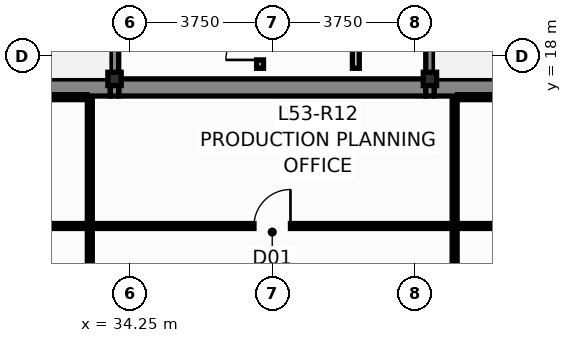
"""IFC4 building model, lengths in metres.
Left out: names, types, materials, properties, quantities, classifications, styles, units other than length and angle.
Written with IfcOpenShell. Run it as: python <this file> out.ifc"""

import sys

from ifc_helpers import new_model, si_unit, direction, frame, frame_2d, origin, origin_2d, place, context, subcontext, project, spatial, rectangle, hollow_rectangle, extrude, source, transform, mapped, element, fill, save


model = new_model("IFC4")
c1 = context("Model", 3, precision=1e-05, world=origin(), true_north=direction((0.0, 1.0)))
c2 = subcontext(c1, "Body", "Model", "MODEL_VIEW")
j1 = project(units=[si_unit("LENGTHUNIT", "METRE"), si_unit("PLANEANGLEUNIT", "RADIAN")], contexts=[c1])
p1 = place(None, origin())
s1 = spatial("IfcSite", under=j1, at=p1, CompositionType="ELEMENT")
p2 = place(p1, origin())
s2 = spatial("IfcBuilding", under=s1, at=p2, CompositionType="ELEMENT")
p3 = place(p2, frame((0.0, 0.0, 202.3)))
s3 = spatial("IfcBuildingStorey", under=s2, at=p3, CompositionType="ELEMENT", Elevation=202.3)
m1 = source(origin(), c2, "Body", "SweptSolid", [
    extrude(hollow_rectangle(XDim=0.35, YDim=0.35, WallThickness=0.016, at=origin_2d()), origin(), (0.0, 0.0, 1.0), 3.65),
])
for number, where, z_axis, x_axis in (
    (1, (33.85, 17.4, 0.0), (0.0, 0.0, 1.0), (1.0, 0.0, 0.0)),
    (2, (42.15, 17.4, 0.0), (0.0, 0.0, 1.0), (1.0, 0.0, 0.0)),
):
    element("IfcColumn", number, at=place(p3, frame(where, z_axis=z_axis, x_axis=x_axis)), inside=s3, PredefinedType="COLUMN", context=c2, shape_type="MappedRepresentation", body=[
        mapped(m1, transform((0.0, 0.0, 0.0), scale=1.0)),
    ])
p4 = place(p3, frame((30.84, 17.175, 0.0), z_axis=(0.0, 0.0, 1.0), x_axis=(1.0, 0.0, 0.0)))
e3 = element("IfcWall", 3, at=p4, inside=s3, PredefinedType="SHEAR", context=c2, shape_type="SweptSolid", body=[
    extrude(rectangle(XDim=2.9, YDim=0.45, at=frame_2d((1.45, 0.0))), origin(), (0.0, 0.0, 1.0), 3.65),
])
p5 = place(p3, frame((33.96, 17.175, 0.0), z_axis=(0.0, 0.0, 1.0), x_axis=(1.0, 0.0, 0.0)))
e4 = element("IfcWall", 4, at=p5, inside=s3, PredefinedType="SHEAR", context=c2, shape_type="SweptSolid", body=[
    extrude(rectangle(XDim=8.08, YDim=0.45, at=frame_2d((4.04, 0.0))), origin(), (0.0, 0.0, 1.0), 3.65),
])
p6 = place(p3, frame((42.26, 17.175, 0.0), z_axis=(0.0, 0.0, 1.0), x_axis=(1.0, 0.0, 0.0)))
e5 = element("IfcWall", 5, at=p6, inside=s3, PredefinedType="SHEAR", context=c2, shape_type="SweptSolid", body=[
    extrude(rectangle(XDim=2.9, YDim=0.45, at=frame_2d((1.45, 0.0))), origin(), (0.0, 0.0, 1.0), 3.65),
])
for number, where, z_axis, x_axis in (
    (6, (33.85, 16.95, 0.0), (0.0, 0.0, 1.0), (0.0, 1.0, 0.0)),
    (7, (42.15, 16.95, 0.0), (0.0, 0.0, 1.0), (0.0, 1.0, 0.0)),
):
    element("IfcWall", number, at=place(p3, frame(where, z_axis=z_axis, x_axis=x_axis)), inside=s3, PredefinedType="SHEAR", context=c2, shape_type="SweptSolid", body=[
        extrude(rectangle(XDim=13.275, YDim=0.22, at=frame_2d((6.638, 0.0))), origin(), (0.0, 0.0, 1.0), 3.65),
    ])
p7 = place(p3, frame((37.68, 17.68, 0.0), z_axis=(0.0, 0.0, 1.0), x_axis=(0.0, 1.0, 0.0)))
e8 = element("IfcWall", 8, at=p7, inside=s3, PredefinedType="PARTITIONING", context=c2, shape_type="SweptSolid", body=[
    extrude(rectangle(XDim=2.7, YDim=0.18, at=frame_2d((1.35, 0.0))), origin(), (0.0, 0.0, 1.0), 3.4),
])
p8 = place(p7, frame((0.22, 0.0, 0.0)))
e9 = element("IfcOpeningElement", 9, at=p8, cuts=e8, PredefinedType="OPENING", context=c2, shape_type="SweptSolid", body=[
    extrude(rectangle(XDim=0.9, YDim=2.1, at=frame_2d((0.45, 1.05))), frame((0.0, 0.102, 0.0), z_axis=(0.0, -1.0, 0.0), x_axis=(1.0, 0.0, 0.0)), (0.0, 0.0, 1.0), 0.204),
])
p9 = place(p7, frame((1.54, 0.0, 0.0)))
e10 = element("IfcOpeningElement", 10, at=p9, cuts=e8, PredefinedType="OPENING", context=c2, shape_type="SweptSolid", body=[
    extrude(rectangle(XDim=0.9, YDim=2.1, at=frame_2d((0.45, 1.05))), frame((0.0, 0.102, 0.0), z_axis=(0.0, -1.0, 0.0), x_axis=(1.0, 0.0, 0.0)), (0.0, 0.0, 1.0), 0.204),
])
p10 = place(p3, frame((40.2, 17.68, 0.0), z_axis=(0.0, 0.0, 1.0), x_axis=(0.0, 1.0, 0.0)))
e11 = element("IfcWall", 11, at=p10, inside=s3, PredefinedType="PARTITIONING", context=c2, shape_type="SweptSolid", body=[
    extrude(rectangle(XDim=2.7, YDim=0.18, at=frame_2d((1.35, 0.0))), origin(), (0.0, 0.0, 1.0), 3.4),
])
p11 = place(p10, frame((0.85, 0.0, 0.0)))
e12 = element("IfcOpeningElement", 12, at=p11, cuts=e11, PredefinedType="OPENING", context=c2, shape_type="SweptSolid", body=[
    extrude(rectangle(XDim=0.9, YDim=2.1, at=frame_2d((0.45, 1.05))), frame((0.0, 0.102, 0.0), z_axis=(0.0, -1.0, 0.0), x_axis=(1.0, 0.0, 0.0)), (0.0, 0.0, 1.0), 0.204),
])
p12 = place(p3, frame((23.505, 13.53, 0.0), z_axis=(0.0, 0.0, 1.0), x_axis=(1.0, 0.0, 0.0)))
e13 = element("IfcWall", 13, at=p12, inside=s3, PredefinedType="PARTITIONING", context=c2, shape_type="SweptSolid", body=[
    extrude(rectangle(XDim=9.69, YDim=0.13, at=frame_2d((4.845, 0.0))), origin(), (0.0, 0.0, 1.0), 3.078),
])
p13 = place(p12, frame((4.365, 0.0, 0.0)))
e14 = element("IfcOpeningElement", 14, at=p13, cuts=e13, PredefinedType="OPENING", context=c2, shape_type="SweptSolid", body=[
    extrude(rectangle(XDim=0.96, YDim=2.15, at=frame_2d((0.48, 1.075))), frame((0.0, 0.077, 0.0), z_axis=(0.0, -1.0, 0.0), x_axis=(1.0, 0.0, 0.0)), (0.0, 0.0, 1.0), 0.154),
])
p14 = place(p3, frame((42.805, 13.53, 0.0), z_axis=(0.0, 0.0, 1.0), x_axis=(1.0, 0.0, 0.0)))
e15 = element("IfcWall", 15, at=p14, inside=s3, PredefinedType="PARTITIONING", context=c2, shape_type="SweptSolid", body=[
    extrude(rectangle(XDim=9.69, YDim=0.13, at=frame_2d((4.845, 0.0))), origin(), (0.0, 0.0, 1.0), 3.078),
])
p15 = place(p14, frame((4.365, 0.0, 0.0)))
e16 = element("IfcOpeningElement", 16, at=p15, cuts=e15, PredefinedType="OPENING", context=c2, shape_type="SweptSolid", body=[
    extrude(rectangle(XDim=0.96, YDim=2.15, at=frame_2d((0.48, 1.075))), frame((0.0, 0.077, 0.0), z_axis=(0.0, -1.0, 0.0), x_axis=(1.0, 0.0, 0.0)), (0.0, 0.0, 1.0), 0.154),
])
p16 = place(p3, frame((42.875, 16.92, 0.0), z_axis=(0.0, 0.0, 1.0), x_axis=(1.0, 0.0, 0.0)))
e17 = element("IfcWall", 17, at=p16, inside=s3, PredefinedType="PARTITIONING", context=c2, shape_type="SweptSolid", body=[
    extrude(rectangle(XDim=9.62, YDim=0.13, at=frame_2d((4.81, 0.0))), origin(), (0.0, 0.0, 1.0), 2.925),
])
p17 = place(p16, frame((4.33, 0.0, 0.0)))
e18 = element("IfcOpeningElement", 18, at=p17, cuts=e17, PredefinedType="OPENING", context=c2, shape_type="SweptSolid", body=[
    extrude(rectangle(XDim=0.96, YDim=2.15, at=frame_2d((0.48, 1.075))), frame((0.0, 0.077, 0.0), z_axis=(0.0, -1.0, 0.0), x_axis=(1.0, 0.0, 0.0)), (0.0, 0.0, 1.0), 0.154),
])
p18 = place(p3, frame((33.205, 13.53, 0.0), z_axis=(0.0, 0.0, 1.0), x_axis=(1.0, 0.0, 0.0)))
e19 = element("IfcWall", 19, at=p18, inside=s3, PredefinedType="PARTITIONING", context=c2, shape_type="SweptSolid", body=[
    extrude(rectangle(XDim=9.59, YDim=0.13, at=frame_2d((4.795, 0.0))), origin(), (0.0, 0.0, 1.0), 3.078),
])
p19 = place(p18, frame((4.315, 0.0, 0.0)))
e20 = element("IfcOpeningElement", 20, at=p19, cuts=e19, PredefinedType="OPENING", context=c2, shape_type="SweptSolid", body=[
    extrude(rectangle(XDim=0.96, YDim=2.15, at=frame_2d((0.48, 1.075))), frame((0.0, 0.077, 0.0), z_axis=(0.0, -1.0, 0.0), x_axis=(1.0, 0.0, 0.0)), (0.0, 0.0, 1.0), 0.154),
])
p20 = place(p3, frame((27.405, 16.92, 0.0), z_axis=(0.0, 0.0, 1.0), x_axis=(1.0, 0.0, 0.0)))
e21 = element("IfcWall", 21, at=p20, inside=s3, PredefinedType="PARTITIONING", context=c2, shape_type="SweptSolid", body=[
    extrude(rectangle(XDim=5.72, YDim=0.13, at=frame_2d((2.86, 0.0))), origin(), (0.0, 0.0, 1.0), 2.925),
])
for number, where, z_axis, x_axis in (
    (22, (33.2, 13.535, 0.0), (0.0, 0.0, 1.0), (0.0, 1.0, 0.0)),
    (23, (42.8, 13.535, 0.0), (0.0, 0.0, 1.0), (0.0, 1.0, 0.0)),
):
    element("IfcWall", number, at=place(p3, frame(where, z_axis=z_axis, x_axis=x_axis)), inside=s3, PredefinedType="PARTITIONING", context=c2, shape_type="SweptSolid", body=[
        extrude(rectangle(XDim=3.31, YDim=0.13, at=frame_2d((1.655, 0.0))), origin(), (0.0, 0.0, 1.0), 3.4),
    ])
p21 = place(p3, frame((33.2, 10.145, 0.0), z_axis=(0.0, 0.0, 1.0), x_axis=(0.0, 1.0, 0.0)))
e24 = element("IfcWall", 24, at=p21, inside=s3, PredefinedType="PARTITIONING", context=c2, shape_type="SweptSolid", body=[
    extrude(rectangle(XDim=3.38, YDim=0.13, at=frame_2d((1.69, 0.0))), origin(), (0.0, 0.0, 1.0), 3.4),
])
p22 = place(p21, frame((1.21, 0.0, 0.0)))
e25 = element("IfcOpeningElement", 25, at=p22, cuts=e24, PredefinedType="OPENING", context=c2, shape_type="SweptSolid", body=[
    extrude(rectangle(XDim=0.96, YDim=2.15, at=frame_2d((0.48, 1.075))), frame((0.0, 0.077, 0.0), z_axis=(0.0, -1.0, 0.0), x_axis=(1.0, 0.0, 0.0)), (0.0, 0.0, 1.0), 0.154),
])
p23 = place(p3, frame((42.8, 10.145, 0.0), z_axis=(0.0, 0.0, 1.0), x_axis=(0.0, 1.0, 0.0)))
e26 = element("IfcWall", 26, at=p23, inside=s3, PredefinedType="PARTITIONING", context=c2, shape_type="SweptSolid", body=[
    extrude(rectangle(XDim=3.38, YDim=0.13, at=frame_2d((1.69, 0.0))), origin(), (0.0, 0.0, 1.0), 3.4),
])
p24 = place(p23, frame((1.21, 0.0, 0.0)))
e27 = element("IfcOpeningElement", 27, at=p24, cuts=e26, PredefinedType="OPENING", context=c2, shape_type="SweptSolid", body=[
    extrude(rectangle(XDim=0.96, YDim=2.15, at=frame_2d((0.48, 1.075))), frame((0.0, 0.077, 0.0), z_axis=(0.0, -1.0, 0.0), x_axis=(1.0, 0.0, 0.0)), (0.0, 0.0, 1.0), 0.154),
])
p25 = place(p8, origin())
e28 = element("IfcDoor", 28, at=p25, inside=s3, OperationType="SINGLE_SWING_LEFT", PredefinedType="DOOR", context=c2, shape_type="SweptSolid", body=[
    extrude(rectangle(XDim=0.9, YDim=2.1, at=frame_2d((0.45, 1.05))), frame((0.0, 0.025, 0.0), z_axis=(0.0, -1.0, 0.0), x_axis=(1.0, 0.0, 0.0)), (0.0, 0.0, 1.0), 0.05),
])
fill(e9, e28)
p26 = place(p19, origin())
e29 = element("IfcDoor", 29, at=p26, inside=s3, OperationType="SINGLE_SWING_RIGHT", PredefinedType="DOOR", context=c2, shape_type="SweptSolid", body=[
    extrude(rectangle(XDim=0.96, YDim=2.15, at=frame_2d((0.48, 1.075))), frame((0.0, 0.025, 0.0), z_axis=(0.0, -1.0, 0.0), x_axis=(1.0, 0.0, 0.0)), (0.0, 0.0, 1.0), 0.05),
])
fill(e20, e29)
save(model, sys.argv[1])
